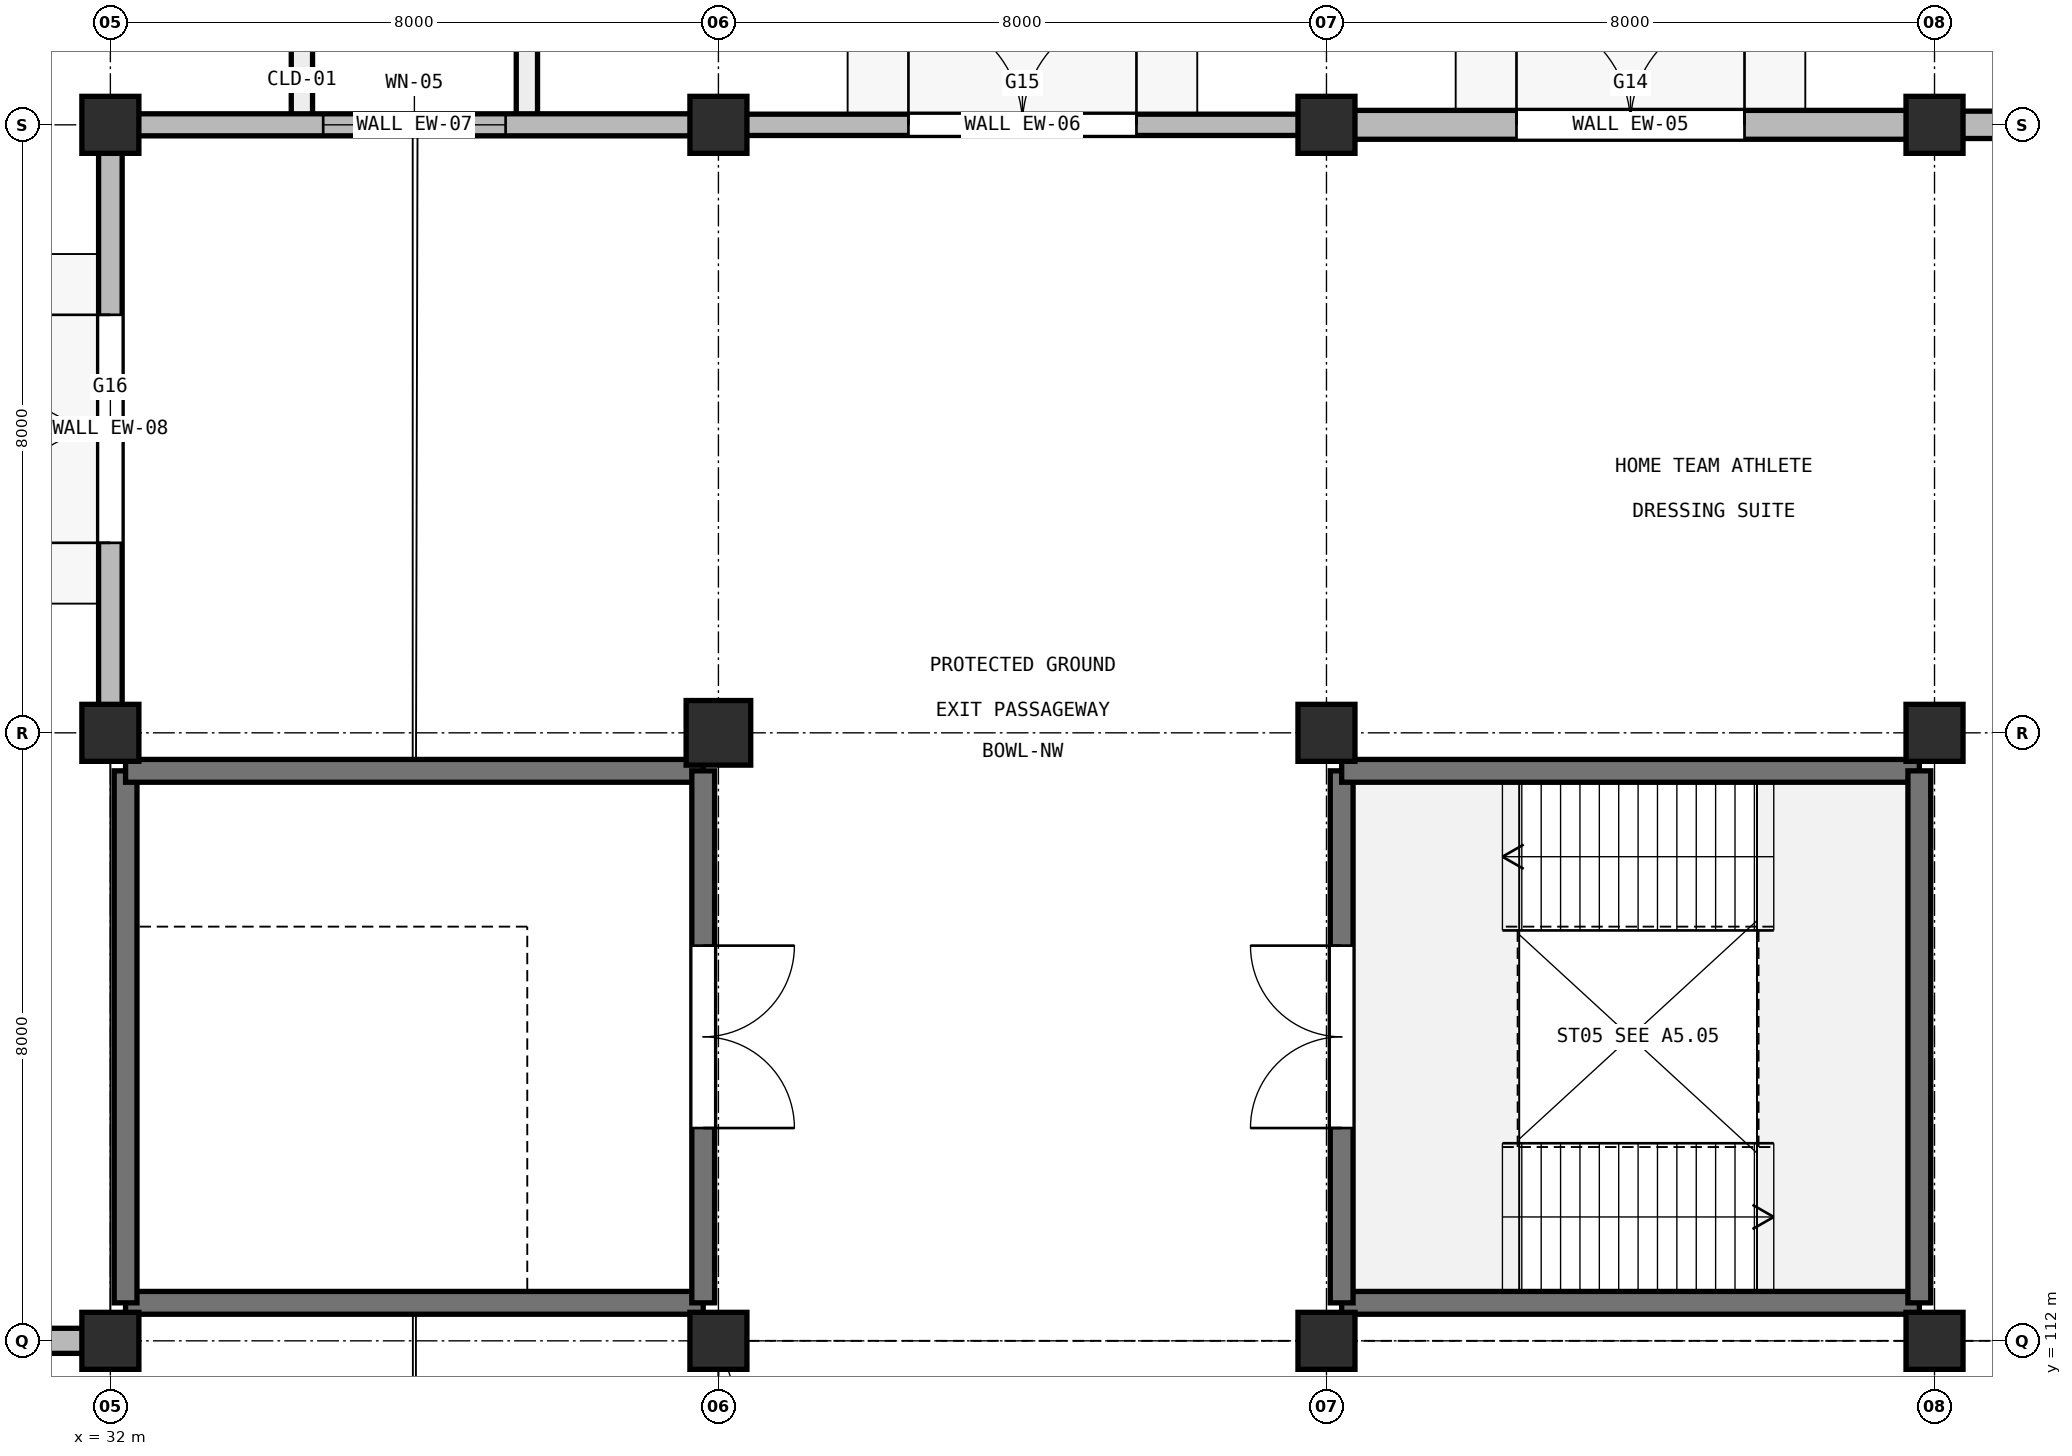
"""IFC4 building model, lengths in metres.
Left out: names, types, materials, properties, quantities, classifications, styles, units other than length and angle.
Written with IfcOpenShell. Run it as: python <this file> out.ifc"""

import sys

from ifc_helpers import new_model, si_unit, direction, frame, frame_2d, origin, origin_2d, place, context, subcontext, project, spatial, rectangle, extrude, element, fill, save


model = new_model("IFC4")
c1 = context("Model", 3, precision=1e-05, world=origin(), true_north=direction((0.0, 1.0)))
c2 = subcontext(c1, "Body", "Model", "MODEL_VIEW")
j1 = project(units=[si_unit("LENGTHUNIT", "METRE"), si_unit("PLANEANGLEUNIT", "RADIAN")], contexts=[c1])
p1 = place(None, origin())
s1 = spatial("IfcSite", under=j1, at=p1, CompositionType="ELEMENT")
p2 = place(p1, origin())
s2 = spatial("IfcBuilding", under=s1, at=p2, CompositionType="ELEMENT")
p3 = place(p2, origin())
s3 = spatial("IfcBuildingStorey", under=s2, at=p3, CompositionType="ELEMENT", Elevation=0.0)
for number, where, z_axis, x_axis in (
    (1, (32.0, 112.0, 0.0), (0.0, 0.0, 1.0), (1.0, 0.0, 0.0)),
    (2, (32.0, 120.0, 0.0), (0.0, 0.0, 1.0), (1.0, 0.0, 0.0)),
    (3, (32.0, 128.0, 0.0), (0.0, 0.0, 1.0), (1.0, 0.0, 0.0)),
    (4, (40.0, 112.0, 0.0), (0.0, 0.0, 1.0), (1.0, 0.0, 0.0)),
):
    element("IfcColumn", number, at=place(p3, frame(where, z_axis=z_axis, x_axis=x_axis)), inside=s3, PredefinedType="COLUMN", context=c2, shape_type="SweptSolid", body=[
        extrude(rectangle(XDim=0.75, YDim=0.75, at=origin_2d()), origin(), (0.0, 0.0, 1.0), 5.4),
    ])
p4 = place(p3, frame((40.0, 120.0, 0.0), z_axis=(0.0, 0.0, 1.0), x_axis=(1.0, 0.0, 0.0)))
e5 = element("IfcColumn", 5, at=p4, inside=s3, PredefinedType="COLUMN", context=c2, shape_type="SweptSolid", body=[
    extrude(rectangle(XDim=0.85, YDim=0.85, at=origin_2d()), origin(), (0.0, 0.0, 1.0), 5.4),
])
for number, where, z_axis, x_axis in (
    (6, (40.0, 128.0, 0.0), (0.0, 0.0, 1.0), (1.0, 0.0, 0.0)),
    (7, (48.0, 112.0, 0.0), (0.0, 0.0, 1.0), (1.0, 0.0, 0.0)),
    (8, (48.0, 120.0, 0.0), (0.0, 0.0, 1.0), (1.0, 0.0, 0.0)),
    (9, (48.0, 128.0, 0.0), (0.0, 0.0, 1.0), (1.0, 0.0, 0.0)),
    (10, (56.0, 112.0, 0.0), (0.0, 0.0, 1.0), (1.0, 0.0, 0.0)),
    (11, (56.0, 120.0, 0.0), (0.0, 0.0, 1.0), (1.0, 0.0, 0.0)),
    (12, (56.0, 128.0, 0.0), (0.0, 0.0, 1.0), (1.0, 0.0, 0.0)),
):
    element("IfcColumn", number, at=place(p3, frame(where, z_axis=z_axis, x_axis=x_axis)), inside=s3, PredefinedType="COLUMN", context=c2, shape_type="SweptSolid", body=[
        extrude(rectangle(XDim=0.75, YDim=0.75, at=origin_2d()), origin(), (0.0, 0.0, 1.0), 5.4),
    ])
p5 = place(p3, frame((56.355, 128.0, 0.0), z_axis=(0.0, 0.0, 1.0), x_axis=(1.0, 0.0, 0.0)))
e13 = element("IfcWall", 13, at=p5, inside=s3, PredefinedType="SOLIDWALL", context=c2, shape_type="SweptSolid", body=[
    extrude(rectangle(XDim=7.29, YDim=0.36, at=frame_2d((3.645, 0.0))), origin(), (0.0, 0.0, 1.0), 4.2),
])
p6 = place(p5, frame((2.145, 0.0, 0.0)))
e14 = element("IfcOpeningElement", 14, at=p6, cuts=e13, PredefinedType="OPENING", context=c2, shape_type="SweptSolid", body=[
    extrude(rectangle(XDim=3.0, YDim=2.4, at=frame_2d((1.5, 1.2))), frame((0.0, 0.19, 0.0), z_axis=(0.0, -1.0, 0.0), x_axis=(1.0, 0.0, 0.0)), (0.0, 0.0, 1.0), 0.38),
])
p7 = place(p3, frame((48.355, 128.0, 0.0), z_axis=(0.0, 0.0, 1.0), x_axis=(1.0, 0.0, 0.0)))
e15 = element("IfcWall", 15, at=p7, inside=s3, PredefinedType="SOLIDWALL", context=c2, shape_type="SweptSolid", body=[
    extrude(rectangle(XDim=7.29, YDim=0.38, at=frame_2d((3.645, 0.0))), origin(), (0.0, 0.0, 1.0), 4.2),
])
p8 = place(p7, frame((2.145, 0.0, 0.0)))
e16 = element("IfcOpeningElement", 16, at=p8, cuts=e15, PredefinedType="OPENING", context=c2, shape_type="SweptSolid", body=[
    extrude(rectangle(XDim=3.0, YDim=2.4, at=frame_2d((1.5, 1.2))), frame((0.0, 0.2, 0.0), z_axis=(0.0, -1.0, 0.0), x_axis=(1.0, 0.0, 0.0)), (0.0, 0.0, 1.0), 0.4),
])
p9 = place(p3, frame((40.355, 128.0, 0.0), z_axis=(0.0, 0.0, 1.0), x_axis=(1.0, 0.0, 0.0)))
e17 = element("IfcWall", 17, at=p9, inside=s3, PredefinedType="SOLIDWALL", context=c2, shape_type="SweptSolid", body=[
    extrude(rectangle(XDim=7.29, YDim=0.28, at=frame_2d((3.645, 0.0))), origin(), (0.0, 0.0, 1.0), 4.2),
])
p10 = place(p9, frame((2.145, 0.0, 0.0)))
e18 = element("IfcOpeningElement", 18, at=p10, cuts=e17, PredefinedType="OPENING", context=c2, shape_type="SweptSolid", body=[
    extrude(rectangle(XDim=3.0, YDim=2.4, at=frame_2d((1.5, 1.2))), frame((0.0, 0.15, 0.0), z_axis=(0.0, -1.0, 0.0), x_axis=(1.0, 0.0, 0.0)), (0.0, 0.0, 1.0), 0.3),
])
p11 = place(p3, frame((32.355, 128.0, 0.0), z_axis=(0.0, 0.0, 1.0), x_axis=(1.0, 0.0, 0.0)))
e19 = element("IfcWall", 19, at=p11, inside=s3, PredefinedType="SOLIDWALL", context=c2, shape_type="SweptSolid", body=[
    extrude(rectangle(XDim=7.29, YDim=0.29, at=frame_2d((3.645, 0.0))), origin(), (0.0, 0.0, 1.0), 4.2),
])
p12 = place(p11, frame((2.445, 0.0, 0.95)))
e20 = element("IfcOpeningElement", 20, at=p12, cuts=e19, PredefinedType="OPENING", context=c2, shape_type="SweptSolid", body=[
    extrude(rectangle(XDim=2.4, YDim=1.6, at=frame_2d((1.2, 0.8))), frame((0.0, 0.155, 0.0), z_axis=(0.0, -1.0, 0.0), x_axis=(1.0, 0.0, 0.0)), (0.0, 0.0, 1.0), 0.31),
])
p13 = place(p3, frame((32.0, 120.355, 0.0), z_axis=(0.0, 0.0, 1.0), x_axis=(0.0, 1.0, 0.0)))
e21 = element("IfcWall", 21, at=p13, inside=s3, PredefinedType="SOLIDWALL", context=c2, shape_type="SweptSolid", body=[
    extrude(rectangle(XDim=7.29, YDim=0.31, at=frame_2d((3.645, 0.0))), origin(), (0.0, 0.0, 1.0), 4.2),
])
p14 = place(p13, frame((2.145, 0.0, 0.0)))
e22 = element("IfcOpeningElement", 22, at=p14, cuts=e21, PredefinedType="OPENING", context=c2, shape_type="SweptSolid", body=[
    extrude(rectangle(XDim=3.0, YDim=2.4, at=frame_2d((1.5, 1.2))), frame((0.0, 0.165, 0.0), z_axis=(0.0, -1.0, 0.0), x_axis=(1.0, 0.0, 0.0)), (0.0, 0.0, 1.0), 0.33),
])
p15 = place(p3, frame((24.355, 112.0, 0.0), z_axis=(0.0, 0.0, 1.0), x_axis=(1.0, 0.0, 0.0)))
e23 = element("IfcWall", 23, at=p15, inside=s3, PredefinedType="SOLIDWALL", context=c2, shape_type="SweptSolid", body=[
    extrude(rectangle(XDim=7.29, YDim=0.33, at=frame_2d((3.645, 0.0))), origin(), (0.0, 0.0, 1.0), 4.2),
])
p16 = place(p15, frame((2.145, 0.0, 0.0)))
e24 = element("IfcOpeningElement", 24, at=p16, cuts=e23, PredefinedType="OPENING", context=c2, shape_type="SweptSolid", body=[
    extrude(rectangle(XDim=3.0, YDim=2.4, at=frame_2d((1.5, 1.2))), frame((0.0, 0.175, 0.0), z_axis=(0.0, -1.0, 0.0), x_axis=(1.0, 0.0, 0.0)), (0.0, 0.0, 1.0), 0.35),
])
p17 = place(p3, frame((39.8, 112.5, 0.0), z_axis=(0.0, 0.0, 1.0), x_axis=(-1.0, 0.0, 0.0)))
e25 = element("IfcWall", 25, at=p17, inside=s3, PredefinedType="SHEAR", context=c2, shape_type="SweptSolid", body=[
    extrude(rectangle(XDim=7.6, YDim=0.3, at=frame_2d((3.8, 0.0))), origin(), (0.0, 0.0, 1.0), 5.08),
])
p18 = place(p3, frame((32.2, 112.5, 0.0), z_axis=(0.0, 0.0, 1.0), x_axis=(0.0, 1.0, 0.0)))
e26 = element("IfcWall", 26, at=p18, inside=s3, PredefinedType="SHEAR", context=c2, shape_type="SweptSolid", body=[
    extrude(rectangle(XDim=7.0, YDim=0.3, at=frame_2d((3.5, 0.0))), origin(), (0.0, 0.0, 1.0), 5.08),
])
p19 = place(p3, frame((32.2, 119.5, 0.0), z_axis=(0.0, 0.0, 1.0), x_axis=(1.0, 0.0, 0.0)))
e27 = element("IfcWall", 27, at=p19, inside=s3, PredefinedType="SHEAR", context=c2, shape_type="SweptSolid", body=[
    extrude(rectangle(XDim=7.6, YDim=0.3, at=frame_2d((3.8, 0.0))), origin(), (0.0, 0.0, 1.0), 5.08),
])
p20 = place(p3, frame((39.8, 119.5, 0.0), z_axis=(0.0, 0.0, 1.0), x_axis=(0.0, -1.0, 0.0)))
e28 = element("IfcWall", 28, at=p20, inside=s3, PredefinedType="SHEAR", context=c2, shape_type="SweptSolid", body=[
    extrude(rectangle(XDim=7.0, YDim=0.3, at=frame_2d((3.5, 0.0))), origin(), (0.0, 0.0, 1.0), 5.08),
])
p21 = place(p20, frame((2.3, 0.0, 0.0)))
e29 = element("IfcOpeningElement", 29, at=p21, cuts=e28, PredefinedType="OPENING", context=c2, shape_type="SweptSolid", body=[
    extrude(rectangle(XDim=2.4, YDim=2.2, at=frame_2d((1.2, 1.1))), frame((0.0, 0.16, 0.0), z_axis=(0.0, -1.0, 0.0), x_axis=(1.0, 0.0, 0.0)), (0.0, 0.0, 1.0), 0.32),
])
p22 = place(p3, frame((55.8, 112.5, 0.0), z_axis=(0.0, 0.0, 1.0), x_axis=(-1.0, 0.0, 0.0)))
e30 = element("IfcWall", 30, at=p22, inside=s3, PredefinedType="SHEAR", context=c2, shape_type="SweptSolid", body=[
    extrude(rectangle(XDim=7.6, YDim=0.3, at=frame_2d((3.8, 0.0))), origin(), (0.0, 0.0, 1.0), 5.08),
])
p23 = place(p3, frame((48.2, 112.5, 0.0), z_axis=(0.0, 0.0, 1.0), x_axis=(0.0, 1.0, 0.0)))
e31 = element("IfcWall", 31, at=p23, inside=s3, PredefinedType="SHEAR", context=c2, shape_type="SweptSolid", body=[
    extrude(rectangle(XDim=7.0, YDim=0.3, at=frame_2d((3.5, 0.0))), origin(), (0.0, 0.0, 1.0), 5.08),
])
p24 = place(p23, frame((2.3, 0.0, 0.0)))
e32 = element("IfcOpeningElement", 32, at=p24, cuts=e31, PredefinedType="OPENING", context=c2, shape_type="SweptSolid", body=[
    extrude(rectangle(XDim=2.4, YDim=2.2, at=frame_2d((1.2, 1.1))), frame((0.0, 0.16, 0.0), z_axis=(0.0, -1.0, 0.0), x_axis=(1.0, 0.0, 0.0)), (0.0, 0.0, 1.0), 0.32),
])
p25 = place(p3, frame((48.2, 119.5, 0.0), z_axis=(0.0, 0.0, 1.0), x_axis=(1.0, 0.0, 0.0)))
e33 = element("IfcWall", 33, at=p25, inside=s3, PredefinedType="SHEAR", context=c2, shape_type="SweptSolid", body=[
    extrude(rectangle(XDim=7.6, YDim=0.3, at=frame_2d((3.8, 0.0))), origin(), (0.0, 0.0, 1.0), 5.08),
])
p26 = place(p3, frame((55.8, 119.5, 0.0), z_axis=(0.0, 0.0, 1.0), x_axis=(0.0, -1.0, 0.0)))
e34 = element("IfcWall", 34, at=p26, inside=s3, PredefinedType="SHEAR", context=c2, shape_type="SweptSolid", body=[
    extrude(rectangle(XDim=7.0, YDim=0.3, at=frame_2d((3.5, 0.0))), origin(), (0.0, 0.0, 1.0), 5.08),
])
p27 = place(p8, origin())
e35 = element("IfcDoor", 35, at=p27, inside=s3, OperationType="DOUBLE_DOOR_SINGLE_SWING", PredefinedType="DOOR", context=c2, shape_type="SweptSolid", body=[
    extrude(rectangle(XDim=3.0, YDim=2.4, at=frame_2d((1.5, 1.2))), frame((0.0, 0.025, 0.0), z_axis=(0.0, -1.0, 0.0), x_axis=(1.0, 0.0, 0.0)), (0.0, 0.0, 1.0), 0.05),
])
fill(e16, e35)
p28 = place(p10, origin())
e36 = element("IfcDoor", 36, at=p28, inside=s3, OperationType="DOUBLE_DOOR_SINGLE_SWING", PredefinedType="DOOR", context=c2, shape_type="SweptSolid", body=[
    extrude(rectangle(XDim=3.0, YDim=2.4, at=frame_2d((1.5, 1.2))), frame((0.0, 0.025, 0.0), z_axis=(0.0, -1.0, 0.0), x_axis=(1.0, 0.0, 0.0)), (0.0, 0.0, 1.0), 0.05),
])
fill(e18, e36)
p29 = place(p12, origin())
e37 = element("IfcWindow", 37, at=p29, inside=s3, PartitioningType="SINGLE_PANEL", PredefinedType="WINDOW", context=c2, shape_type="SweptSolid", body=[
    extrude(rectangle(XDim=2.4, YDim=1.6, at=frame_2d((1.2, 0.8))), frame((0.0, 0.03, 0.0), z_axis=(0.0, -1.0, 0.0), x_axis=(1.0, 0.0, 0.0)), (0.0, 0.0, 1.0), 0.06),
])
fill(e20, e37)
p30 = place(p14, origin())
e38 = element("IfcDoor", 38, at=p30, inside=s3, OperationType="DOUBLE_DOOR_SINGLE_SWING", PredefinedType="DOOR", context=c2, shape_type="SweptSolid", body=[
    extrude(rectangle(XDim=3.0, YDim=2.4, at=frame_2d((1.5, 1.2))), frame((0.0, 0.025, 0.0), z_axis=(0.0, -1.0, 0.0), x_axis=(1.0, 0.0, 0.0)), (0.0, 0.0, 1.0), 0.05),
])
fill(e22, e38)
p31 = place(p21, origin())
e39 = element("IfcDoor", 39, at=p31, inside=s3, OperationType="DOUBLE_DOOR_SINGLE_SWING", PredefinedType="DOOR", context=c2, shape_type="SweptSolid", body=[
    extrude(rectangle(XDim=2.4, YDim=2.2, at=frame_2d((1.2, 1.1))), frame((0.0, 0.025, 0.0), z_axis=(0.0, -1.0, 0.0), x_axis=(1.0, 0.0, 0.0)), (0.0, 0.0, 1.0), 0.05),
])
fill(e29, e39)
p32 = place(p24, origin())
e40 = element("IfcDoor", 40, at=p32, inside=s3, OperationType="DOUBLE_DOOR_SINGLE_SWING", PredefinedType="DOOR", context=c2, shape_type="SweptSolid", body=[
    extrude(rectangle(XDim=2.4, YDim=2.2, at=frame_2d((1.2, 1.1))), frame((0.0, 0.025, 0.0), z_axis=(0.0, -1.0, 0.0), x_axis=(1.0, 0.0, 0.0)), (0.0, 0.0, 1.0), 0.05),
])
fill(e32, e40)
save(model, sys.argv[1])
